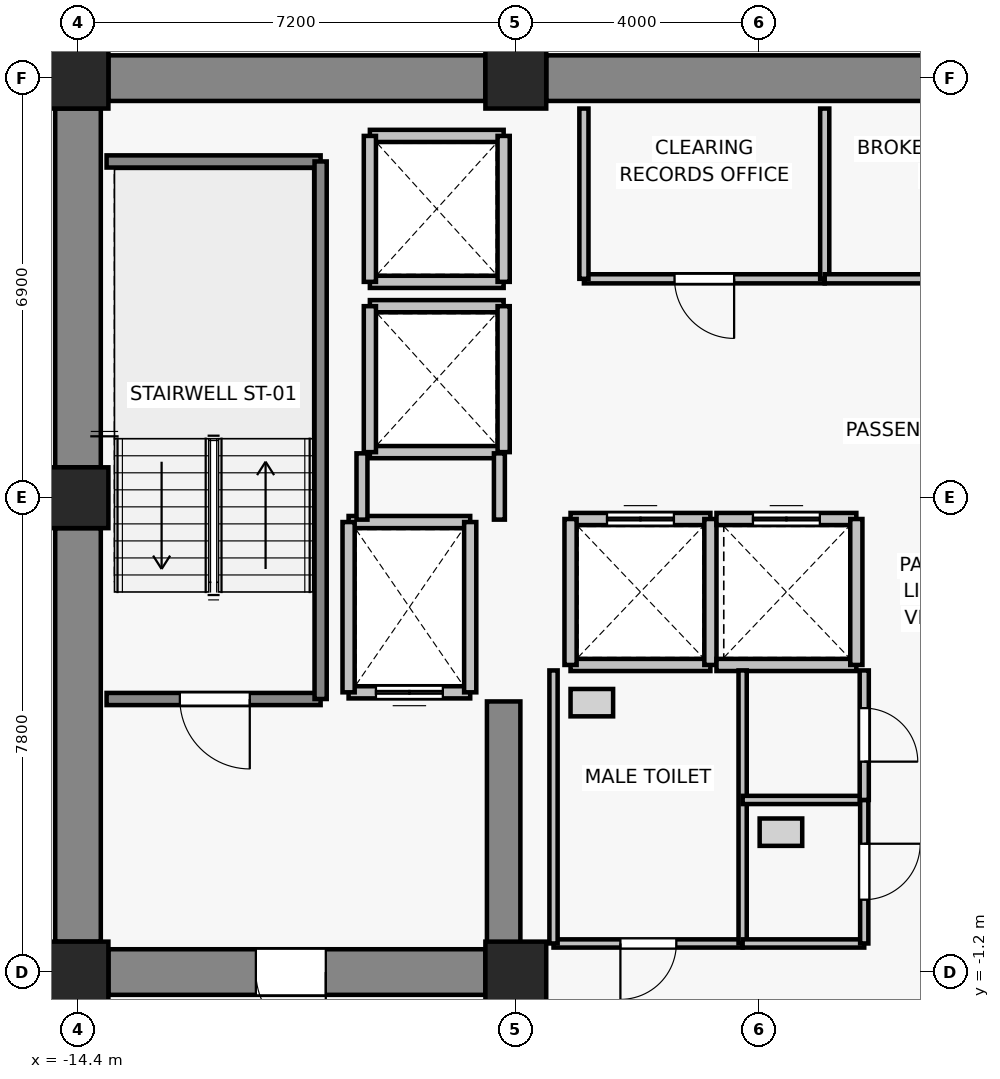
"""IFC4 building model, lengths in metres.
Left out: names, types, materials, properties, quantities, classifications, styles, units other than length and angle.
Written with IfcOpenShell. Run it as: python <this file> out.ifc"""

import sys

from ifc_helpers import new_model, si_unit, direction, frame, frame_2d, origin, origin_2d, place, context, subcontext, project, spatial, rectangle, extrude, source, transform, mapped, element, fill, save


model = new_model("IFC4")
c1 = context("Model", 3, precision=1e-05, world=origin(), true_north=direction((0.0, 1.0)))
c2 = subcontext(c1, "Body", "Model", "MODEL_VIEW")
j1 = project(units=[si_unit("LENGTHUNIT", "METRE"), si_unit("PLANEANGLEUNIT", "RADIAN")], contexts=[c1])
p1 = place(None, origin())
s1 = spatial("IfcSite", under=j1, at=p1, CompositionType="ELEMENT")
p2 = place(p1, origin())
s2 = spatial("IfcBuilding", under=s1, at=p2, CompositionType="ELEMENT")
p3 = place(p2, frame((0.0, 0.0, 113.2)))
s3 = spatial("IfcBuildingStorey", under=s2, at=p3, CompositionType="ELEMENT", Elevation=113.2)
for number, where, z_axis, x_axis in (
    (1, (-14.4, -1.2, 0.0), (0.0, 0.0, 1.0), (1.0, 0.0, 0.0)),
    (2, (-7.2, -1.2, 0.0), (0.0, 0.0, 1.0), (1.0, 0.0, 0.0)),
    (3, (-14.4, 6.6, 0.0), (0.0, 0.0, 1.0), (1.0, 0.0, 0.0)),
    (4, (-14.4, 13.5, 0.0), (0.0, 0.0, 1.0), (1.0, 0.0, 0.0)),
    (5, (-7.2, 13.5, 0.0), (0.0, 0.0, 1.0), (1.0, 0.0, 0.0)),
):
    element("IfcColumn", number, at=place(p3, frame(where, z_axis=z_axis, x_axis=x_axis)), inside=s3, PredefinedType="COLUMN", context=c2, shape_type="SweptSolid", body=[
        extrude(rectangle(XDim=1.0, YDim=1.0, at=origin_2d()), origin(), (0.0, 0.0, 1.0), 3.3),
    ])
p4 = place(p3, frame((-13.9, 13.5, 0.0), z_axis=(0.0, 0.0, 1.0), x_axis=(1.0, 0.0, 0.0)))
e6 = element("IfcWall", 6, at=p4, inside=s3, PredefinedType="SHEAR", context=c2, shape_type="SweptSolid", body=[
    extrude(rectangle(XDim=6.2, YDim=0.75, at=frame_2d((3.1, 0.0))), origin(), (0.0, 0.0, 1.0), 3.075),
])
p5 = place(p3, frame((-6.7, 13.5, 0.0), z_axis=(0.0, 0.0, 1.0), x_axis=(1.0, 0.0, 0.0)))
e7 = element("IfcWall", 7, at=p5, inside=s3, PredefinedType="SHEAR", context=c2, shape_type="SweptSolid", body=[
    extrude(rectangle(XDim=13.4, YDim=0.75, at=frame_2d((6.7, 0.0))), origin(), (0.0, 0.0, 1.0), 3.075),
])
p6 = place(p3, frame((-14.4, -0.7, 0.0), z_axis=(0.0, 0.0, 1.0), x_axis=(0.0, 1.0, 0.0)))
e8 = element("IfcWall", 8, at=p6, inside=s3, PredefinedType="SHEAR", context=c2, shape_type="SweptSolid", body=[
    extrude(rectangle(XDim=6.8, YDim=0.75, at=frame_2d((3.4, 0.0))), origin(), (0.0, 0.0, 1.0), 3.075),
])
p7 = place(p3, frame((-14.4, 7.1, 0.0), z_axis=(0.0, 0.0, 1.0), x_axis=(0.0, 1.0, 0.0)))
e9 = element("IfcWall", 9, at=p7, inside=s3, PredefinedType="SHEAR", context=c2, shape_type="SweptSolid", body=[
    extrude(rectangle(XDim=5.9, YDim=0.75, at=frame_2d((2.95, 0.0))), origin(), (0.0, 0.0, 1.0), 3.075),
])
p8 = place(p3, frame((-7.7, -1.2, 0.0), z_axis=(0.0, 0.0, 1.0), x_axis=(-1.0, 0.0, 0.0)))
e10 = element("IfcWall", 10, at=p8, inside=s3, PredefinedType="SHEAR", context=c2, shape_type="SweptSolid", body=[
    extrude(rectangle(XDim=6.2, YDim=0.75, at=frame_2d((3.1, 0.0))), origin(), (0.0, 0.0, 1.0), 3.075),
])
p9 = place(p8, frame((2.625, 0.0, 0.0)))
e11 = element("IfcOpeningElement", 11, at=p9, cuts=e10, PredefinedType="OPENING", context=c2, shape_type="SweptSolid", body=[
    extrude(rectangle(XDim=1.15, YDim=2.15, at=frame_2d((0.575, 1.075))), frame((0.0, 0.385, 0.0), z_axis=(0.0, -1.0, 0.0), x_axis=(1.0, 0.0, 0.0)), (0.0, 0.0, 1.0), 0.77),
])
p10 = place(p3, frame((-7.4, -0.825, 0.0), z_axis=(0.0, 0.0, 1.0), x_axis=(0.0, 1.0, 0.0)))
e12 = element("IfcWall", 12, at=p10, inside=s3, PredefinedType="SHEAR", context=c2, shape_type="SweptSolid", body=[
    extrude(rectangle(XDim=4.075, YDim=0.55, at=frame_2d((2.038, 0.0))), origin(), (0.0, 0.0, 1.0), 3.075),
])
p11 = place(p3, frame((-7.95, 3.4, 0.0), z_axis=(0.0, 0.0, 1.0), x_axis=(-1.0, 0.0, 0.0)))
e13 = element("IfcWall", 13, at=p11, inside=s3, PredefinedType="SOLIDWALL", context=c2, shape_type="SweptSolid", body=[
    extrude(rectangle(XDim=2.0, YDim=0.2, at=frame_2d((1.0, 0.0))), origin(), (0.0, 0.0, 1.0), 3.075),
])
p12 = place(p11, frame((0.45, 0.0, 0.0)))
e14 = element("IfcOpeningElement", 14, at=p12, cuts=e13, PredefinedType="OPENING", context=c2, shape_type="SweptSolid", body=[
    extrude(rectangle(XDim=1.1, YDim=2.2, at=frame_2d((0.55, 1.1))), frame((0.0, 0.11, 0.0), z_axis=(0.0, -1.0, 0.0), x_axis=(1.0, 0.0, 0.0)), (0.0, 0.0, 1.0), 0.22),
])
p13 = place(p3, frame((-9.95, 6.2, 0.0), z_axis=(0.0, 0.0, 1.0), x_axis=(1.0, 0.0, 0.0)))
e15 = element("IfcWall", 15, at=p13, inside=s3, PredefinedType="SOLIDWALL", context=c2, shape_type="SweptSolid", body=[
    extrude(rectangle(XDim=2.0, YDim=0.2, at=frame_2d((1.0, 0.0))), origin(), (0.0, 0.0, 1.0), 3.075),
])
for number, where, z_axis, x_axis in (
    (16, (-9.95, 3.4, 0.0), (0.0, 0.0, 1.0), (0.0, 1.0, 0.0)),
    (17, (-7.95, 6.2, 0.0), (0.0, 0.0, 1.0), (0.0, -1.0, 0.0)),
):
    element("IfcWall", number, at=place(p3, frame(where, z_axis=z_axis, x_axis=x_axis)), inside=s3, PredefinedType="SOLIDWALL", context=c2, shape_type="SweptSolid", body=[
        extrude(rectangle(XDim=2.8, YDim=0.2, at=frame_2d((1.4, 0.0))), origin(), (0.0, 0.0, 1.0), 3.075),
    ])
p14 = place(p3, frame((-4.0, 3.85, 0.0), z_axis=(0.0, 0.0, 1.0), x_axis=(-1.0, 0.0, 0.0)))
e18 = element("IfcWall", 18, at=p14, inside=s3, PredefinedType="SOLIDWALL", context=c2, shape_type="SweptSolid", body=[
    extrude(rectangle(XDim=2.3, YDim=0.2, at=frame_2d((1.15, 0.0))), origin(), (0.0, 0.0, 1.0), 3.075),
])
p15 = place(p3, frame((-6.3, 6.25, 0.0), z_axis=(0.0, 0.0, 1.0), x_axis=(1.0, 0.0, 0.0)))
e19 = element("IfcWall", 19, at=p15, inside=s3, PredefinedType="SOLIDWALL", context=c2, shape_type="SweptSolid", body=[
    extrude(rectangle(XDim=2.3, YDim=0.2, at=frame_2d((1.15, 0.0))), origin(), (0.0, 0.0, 1.0), 3.075),
])
p16 = place(p15, frame((0.6, 0.0, 0.0)))
e20 = element("IfcOpeningElement", 20, at=p16, cuts=e19, PredefinedType="OPENING", context=c2, shape_type="SweptSolid", body=[
    extrude(rectangle(XDim=1.1, YDim=2.2, at=frame_2d((0.55, 1.1))), frame((0.0, 0.11, 0.0), z_axis=(0.0, -1.0, 0.0), x_axis=(1.0, 0.0, 0.0)), (0.0, 0.0, 1.0), 0.22),
])
for number, where, z_axis, x_axis in (
    (21, (-6.3, 3.85, 0.0), (0.0, 0.0, 1.0), (0.0, 1.0, 0.0)),
    (22, (-4.0, 6.25, 0.0), (0.0, 0.0, 1.0), (0.0, -1.0, 0.0)),
):
    element("IfcWall", number, at=place(p3, frame(where, z_axis=z_axis, x_axis=x_axis)), inside=s3, PredefinedType="SOLIDWALL", context=c2, shape_type="SweptSolid", body=[
        extrude(rectangle(XDim=2.4, YDim=0.2, at=frame_2d((1.2, 0.0))), origin(), (0.0, 0.0, 1.0), 3.075),
    ])
p17 = place(p3, frame((-1.6, 3.85, 0.0), z_axis=(0.0, 0.0, 1.0), x_axis=(-1.0, 0.0, 0.0)))
e23 = element("IfcWall", 23, at=p17, inside=s3, PredefinedType="SOLIDWALL", context=c2, shape_type="SweptSolid", body=[
    extrude(rectangle(XDim=2.3, YDim=0.2, at=frame_2d((1.15, 0.0))), origin(), (0.0, 0.0, 1.0), 3.075),
])
p18 = place(p3, frame((-3.9, 6.25, 0.0), z_axis=(0.0, 0.0, 1.0), x_axis=(1.0, 0.0, 0.0)))
e24 = element("IfcWall", 24, at=p18, inside=s3, PredefinedType="SOLIDWALL", context=c2, shape_type="SweptSolid", body=[
    extrude(rectangle(XDim=2.3, YDim=0.2, at=frame_2d((1.15, 0.0))), origin(), (0.0, 0.0, 1.0), 3.075),
])
p19 = place(p18, frame((0.6, 0.0, 0.0)))
e25 = element("IfcOpeningElement", 25, at=p19, cuts=e24, PredefinedType="OPENING", context=c2, shape_type="SweptSolid", body=[
    extrude(rectangle(XDim=1.1, YDim=2.2, at=frame_2d((0.55, 1.1))), frame((0.0, 0.11, 0.0), z_axis=(0.0, -1.0, 0.0), x_axis=(1.0, 0.0, 0.0)), (0.0, 0.0, 1.0), 0.22),
])
p20 = place(p3, frame((-1.6, 6.25, 0.0), z_axis=(0.0, 0.0, 1.0), x_axis=(0.0, -1.0, 0.0)))
e26 = element("IfcWall", 26, at=p20, inside=s3, PredefinedType="SOLIDWALL", context=c2, shape_type="SweptSolid", body=[
    extrude(rectangle(XDim=2.4, YDim=0.2, at=frame_2d((1.2, 0.0))), origin(), (0.0, 0.0, 1.0), 3.075),
])
for number, where, z_axis, x_axis in (
    (27, (-7.4, 7.35, 0.0), (0.0, 0.0, 1.0), (-1.0, 0.0, 0.0)),
    (28, (-9.6, 9.75, 0.0), (0.0, 0.0, 1.0), (1.0, 0.0, 0.0)),
):
    element("IfcWall", number, at=place(p3, frame(where, z_axis=z_axis, x_axis=x_axis)), inside=s3, PredefinedType="SOLIDWALL", context=c2, shape_type="SweptSolid", body=[
        extrude(rectangle(XDim=2.2, YDim=0.2, at=frame_2d((1.1, 0.0))), origin(), (0.0, 0.0, 1.0), 2.515),
    ])
p21 = place(p3, frame((-9.6, 7.35, 0.0), z_axis=(0.0, 0.0, 1.0), x_axis=(0.0, 1.0, 0.0)))
e29 = element("IfcWall", 29, at=p21, inside=s3, PredefinedType="SOLIDWALL", context=c2, shape_type="SweptSolid", body=[
    extrude(rectangle(XDim=2.4, YDim=0.2, at=frame_2d((1.2, 0.0))), origin(), (0.0, 0.0, 1.0), 3.075),
])
p22 = place(p3, frame((-7.4, 9.75, 0.0), z_axis=(0.0, 0.0, 1.0), x_axis=(0.0, -1.0, 0.0)))
e30 = element("IfcWall", 30, at=p22, inside=s3, PredefinedType="SOLIDWALL", context=c2, shape_type="SweptSolid", body=[
    extrude(rectangle(XDim=2.4, YDim=0.2, at=frame_2d((1.2, 0.0))), origin(), (0.0, 0.0, 1.0), 2.515),
])
for number, where, z_axis, x_axis in (
    (31, (-7.4, 10.15, 0.0), (0.0, 0.0, 1.0), (-1.0, 0.0, 0.0)),
    (32, (-9.6, 12.55, 0.0), (0.0, 0.0, 1.0), (1.0, 0.0, 0.0)),
):
    element("IfcWall", number, at=place(p3, frame(where, z_axis=z_axis, x_axis=x_axis)), inside=s3, PredefinedType="SOLIDWALL", context=c2, shape_type="SweptSolid", body=[
        extrude(rectangle(XDim=2.2, YDim=0.2, at=frame_2d((1.1, 0.0))), origin(), (0.0, 0.0, 1.0), 2.515),
    ])
p23 = place(p3, frame((-9.6, 10.15, 0.0), z_axis=(0.0, 0.0, 1.0), x_axis=(0.0, 1.0, 0.0)))
e33 = element("IfcWall", 33, at=p23, inside=s3, PredefinedType="SOLIDWALL", context=c2, shape_type="SweptSolid", body=[
    extrude(rectangle(XDim=2.4, YDim=0.2, at=frame_2d((1.2, 0.0))), origin(), (0.0, 0.0, 1.0), 3.075),
])
p24 = place(p3, frame((-7.4, 12.55, 0.0), z_axis=(0.0, 0.0, 1.0), x_axis=(0.0, -1.0, 0.0)))
e34 = element("IfcWall", 34, at=p24, inside=s3, PredefinedType="SOLIDWALL", context=c2, shape_type="SweptSolid", body=[
    extrude(rectangle(XDim=2.4, YDim=0.2, at=frame_2d((1.2, 0.0))), origin(), (0.0, 0.0, 1.0), 2.515),
])
p25 = place(p3, frame((-10.41, 3.29, 0.0), z_axis=(0.0, 0.0, 1.0), x_axis=(-1.0, 0.0, 0.0)))
e35 = element("IfcWall", 35, at=p25, inside=s3, PredefinedType="SOLIDWALL", context=c2, shape_type="SweptSolid", body=[
    extrude(rectangle(XDim=3.52, YDim=0.2, at=frame_2d((1.76, 0.0))), origin(), (0.0, 0.0, 1.0), 3.075),
])
p26 = place(p25, frame((1.165, 0.0, 0.0)))
e36 = element("IfcOpeningElement", 36, at=p26, cuts=e35, PredefinedType="OPENING", context=c2, shape_type="SweptSolid", body=[
    extrude(rectangle(XDim=1.15, YDim=2.15, at=frame_2d((0.575, 1.075))), frame((0.0, 0.11, 0.0), z_axis=(0.0, -1.0, 0.0), x_axis=(1.0, 0.0, 0.0)), (0.0, 0.0, 1.0), 0.22),
])
p27 = place(p3, frame((-13.93, 12.13, 0.0), z_axis=(0.0, 0.0, 1.0), x_axis=(1.0, 0.0, 0.0)))
e37 = element("IfcWall", 37, at=p27, inside=s3, PredefinedType="SOLIDWALL", context=c2, shape_type="SweptSolid", body=[
    extrude(rectangle(XDim=3.52, YDim=0.2, at=frame_2d((1.76, 0.0))), origin(), (0.0, 0.0, 1.0), 3.075),
])
p28 = place(p3, frame((-10.41, 12.13, 0.0), z_axis=(0.0, 0.0, 1.0), x_axis=(0.0, -1.0, 0.0)))
e38 = element("IfcWall", 38, at=p28, inside=s3, PredefinedType="SOLIDWALL", context=c2, shape_type="SweptSolid", body=[
    extrude(rectangle(XDim=8.84, YDim=0.2, at=frame_2d((4.42, 0.0))), origin(), (0.0, 0.0, 1.0), 3.075),
])
p29 = place(p3, frame((-9.73, 6.24, 0.0), z_axis=(0.0, 0.0, 1.0), x_axis=(0.0, 1.0, 0.0)))
e39 = element("IfcWall", 39, at=p29, inside=s3, PredefinedType="PARTITIONING", context=c2, shape_type="SweptSolid", body=[
    extrude(rectangle(XDim=1.09, YDim=0.18, at=frame_2d((0.545, 0.0))), origin(), (0.0, 0.0, 1.0), 3.075),
])
p30 = place(p3, frame((-7.47, 7.33, 0.0), z_axis=(0.0, 0.0, 1.0), x_axis=(0.0, -1.0, 0.0)))
e40 = element("IfcWall", 40, at=p30, inside=s3, PredefinedType="PARTITIONING", context=c2, shape_type="SweptSolid", body=[
    extrude(rectangle(XDim=1.09, YDim=0.18, at=frame_2d((0.545, 0.0))), origin(), (0.0, 0.0, 1.0), 2.515),
])
p31 = place(p3, frame((-2.12, 10.2, 0.0), z_axis=(0.0, 0.0, 1.0), x_axis=(-1.0, 0.0, 0.0)))
e41 = element("IfcWall", 41, at=p31, inside=s3, PredefinedType="PARTITIONING", context=c2, shape_type="SweptSolid", body=[
    extrude(rectangle(XDim=3.96, YDim=0.15, at=frame_2d((1.98, 0.0))), origin(), (0.0, 0.0, 1.0), 3.075),
])
p32 = place(p31, frame((1.49, 0.0, 0.0)))
e42 = element("IfcOpeningElement", 42, at=p32, cuts=e41, PredefinedType="OPENING", context=c2, shape_type="SweptSolid", body=[
    extrude(rectangle(XDim=0.98, YDim=2.15, at=frame_2d((0.49, 1.075))), frame((0.0, 0.085, 0.0), z_axis=(0.0, -1.0, 0.0), x_axis=(1.0, 0.0, 0.0)), (0.0, 0.0, 1.0), 0.17),
])
for number, where, z_axis, x_axis in (
    (43, (-6.08, 10.2, 0.0), (0.0, 0.0, 1.0), (0.0, 1.0, 0.0)),
    (44, (-2.12, 13.0, 0.0), (0.0, 0.0, 1.0), (0.0, -1.0, 0.0)),
):
    element("IfcWall", number, at=place(p3, frame(where, z_axis=z_axis, x_axis=x_axis)), inside=s3, PredefinedType="PARTITIONING", context=c2, shape_type="SweptSolid", body=[
        extrude(rectangle(XDim=2.8, YDim=0.15, at=frame_2d((1.4, 0.0))), origin(), (0.0, 0.0, 1.0), 3.075),
    ])
p33 = place(p3, frame((2.04, 10.2, 0.0), z_axis=(0.0, 0.0, 1.0), x_axis=(-1.0, 0.0, 0.0)))
e45 = element("IfcWall", 45, at=p33, inside=s3, PredefinedType="PARTITIONING", context=c2, shape_type="SweptSolid", body=[
    extrude(rectangle(XDim=4.16, YDim=0.15, at=frame_2d((2.08, 0.0))), origin(), (0.0, 0.0, 1.0), 3.075),
])
p34 = place(p33, frame((1.55, 0.0, 0.0)))
e46 = element("IfcOpeningElement", 46, at=p34, cuts=e45, PredefinedType="OPENING", context=c2, shape_type="SweptSolid", body=[
    extrude(rectangle(XDim=0.98, YDim=2.15, at=frame_2d((0.49, 1.075))), frame((0.0, 0.085, 0.0), z_axis=(0.0, -1.0, 0.0), x_axis=(1.0, 0.0, 0.0)), (0.0, 0.0, 1.0), 0.17),
])
p35 = place(p3, frame((-3.47, -0.73, 0.0), z_axis=(0.0, 0.0, 1.0), x_axis=(-1.0, 0.0, 0.0)))
e47 = element("IfcWall", 47, at=p35, inside=s3, PredefinedType="PARTITIONING", context=c2, shape_type="SweptSolid", body=[
    extrude(rectangle(XDim=3.11, YDim=0.135, at=frame_2d((1.555, 0.0))), origin(), (0.0, 0.0, 1.0), 3.075),
])
p36 = place(p35, frame((1.09, 0.0, 0.0)))
e48 = element("IfcOpeningElement", 48, at=p36, cuts=e47, PredefinedType="OPENING", context=c2, shape_type="SweptSolid", body=[
    extrude(rectangle(XDim=0.92, YDim=2.1, at=frame_2d((0.46, 1.05))), frame((0.0, 0.077, 0.0), z_axis=(0.0, -1.0, 0.0), x_axis=(1.0, 0.0, 0.0)), (0.0, 0.0, 1.0), 0.155),
])
for number, where, z_axis, x_axis in (
    (49, (-6.58, -0.73, 0.0), (0.0, 0.0, 1.0), (0.0, 1.0, 0.0)),
    (50, (-3.47, 3.76, 0.0), (0.0, 0.0, 1.0), (0.0, -1.0, 0.0)),
):
    element("IfcWall", number, at=place(p3, frame(where, z_axis=z_axis, x_axis=x_axis)), inside=s3, PredefinedType="PARTITIONING", context=c2, shape_type="SweptSolid", body=[
        extrude(rectangle(XDim=4.49, YDim=0.135, at=frame_2d((2.245, 0.0))), origin(), (0.0, 0.0, 1.0), 3.075),
    ])
for number, where, z_axis, x_axis in (
    (51, (-1.47, -0.73, 0.0), (0.0, 0.0, 1.0), (-1.0, 0.0, 0.0)),
    (52, (-3.47, 1.63, 0.0), (0.0, 0.0, 1.0), (1.0, 0.0, 0.0)),
):
    element("IfcWall", number, at=place(p3, frame(where, z_axis=z_axis, x_axis=x_axis)), inside=s3, PredefinedType="PARTITIONING", context=c2, shape_type="SweptSolid", body=[
        extrude(rectangle(XDim=2.0, YDim=0.135, at=frame_2d((1.0, 0.0))), origin(), (0.0, 0.0, 1.0), 3.075),
    ])
p37 = place(p3, frame((-1.47, 1.63, 0.0), z_axis=(0.0, 0.0, 1.0), x_axis=(0.0, -1.0, 0.0)))
e53 = element("IfcWall", 53, at=p37, inside=s3, PredefinedType="PARTITIONING", context=c2, shape_type="SweptSolid", body=[
    extrude(rectangle(XDim=2.36, YDim=0.135, at=frame_2d((1.18, 0.0))), origin(), (0.0, 0.0, 1.0), 3.075),
])
p38 = place(p37, frame((0.72, 0.0, 0.0)))
e54 = element("IfcOpeningElement", 54, at=p38, cuts=e53, PredefinedType="OPENING", context=c2, shape_type="SweptSolid", body=[
    extrude(rectangle(XDim=0.92, YDim=2.1, at=frame_2d((0.46, 1.05))), frame((0.0, 0.077, 0.0), z_axis=(0.0, -1.0, 0.0), x_axis=(1.0, 0.0, 0.0)), (0.0, 0.0, 1.0), 0.155),
])
p39 = place(p3, frame((-1.47, 3.76, 0.0), z_axis=(0.0, 0.0, 1.0), x_axis=(0.0, -1.0, 0.0)))
e55 = element("IfcWall", 55, at=p39, inside=s3, PredefinedType="PARTITIONING", context=c2, shape_type="SweptSolid", body=[
    extrude(rectangle(XDim=2.13, YDim=0.15, at=frame_2d((1.065, 0.0))), origin(), (0.0, 0.0, 1.0), 3.075),
])
p40 = place(p39, frame((0.62, 0.0, 0.0)))
e56 = element("IfcOpeningElement", 56, at=p40, cuts=e55, PredefinedType="OPENING", context=c2, shape_type="SweptSolid", body=[
    extrude(rectangle(XDim=0.88, YDim=2.1, at=frame_2d((0.44, 1.05))), frame((0.0, 0.085, 0.0), z_axis=(0.0, -1.0, 0.0), x_axis=(1.0, 0.0, 0.0)), (0.0, 0.0, 1.0), 0.17),
])
m1 = source(origin(), c2, "Body", "SweptSolid", [
    extrude(rectangle(XDim=1.1, YDim=2.2, at=frame_2d((0.55, 1.1))), frame((0.0, 0.025, 0.0), z_axis=(0.0, -1.0, 0.0), x_axis=(1.0, 0.0, 0.0)), (0.0, 0.0, 1.0), 0.05),
])
p41 = place(p12, origin())
e57 = element("IfcDoor", 57, at=p41, inside=s3, OperationType="DOUBLE_DOOR_SLIDING", PredefinedType="DOOR", context=c2, shape_type="MappedRepresentation", body=[
    mapped(m1, transform((0.0, 0.0, 0.0), x_axis=(1.0, 0.0, 0.0), y_axis=(0.0, 1.0, 0.0), z_axis=(0.0, 0.0, 1.0), scale=1.0)),
])
fill(e14, e57)
p42 = place(p16, origin())
e58 = element("IfcDoor", 58, at=p42, inside=s3, OperationType="DOUBLE_DOOR_SLIDING", PredefinedType="DOOR", context=c2, shape_type="MappedRepresentation", body=[
    mapped(m1, transform((0.0, 0.0, 0.0), x_axis=(1.0, 0.0, 0.0), y_axis=(0.0, 1.0, 0.0), z_axis=(0.0, 0.0, 1.0), scale=1.0)),
])
fill(e20, e58)
p43 = place(p19, origin())
e59 = element("IfcDoor", 59, at=p43, inside=s3, OperationType="DOUBLE_DOOR_SLIDING", PredefinedType="DOOR", context=c2, shape_type="MappedRepresentation", body=[
    mapped(m1, transform((0.0, 0.0, 0.0), x_axis=(1.0, 0.0, 0.0), y_axis=(0.0, 1.0, 0.0), z_axis=(0.0, 0.0, 1.0), scale=1.0)),
])
fill(e25, e59)
m2 = source(origin(), c2, "Body", "SweptSolid", [
    extrude(rectangle(XDim=1.15, YDim=2.15, at=frame_2d((0.575, 1.075))), frame((0.0, 0.025, 0.0), z_axis=(0.0, -1.0, 0.0), x_axis=(1.0, 0.0, 0.0)), (0.0, 0.0, 1.0), 0.05),
])
p44 = place(p26, origin())
e60 = element("IfcDoor", 60, at=p44, inside=s3, OperationType="SINGLE_SWING_LEFT", PredefinedType="DOOR", context=c2, shape_type="MappedRepresentation", body=[
    mapped(m2, transform((0.0, 0.0, 0.0), x_axis=(1.0, 0.0, 0.0), y_axis=(0.0, 1.0, 0.0), z_axis=(0.0, 0.0, 1.0), scale=1.0)),
])
fill(e36, e60)
p45 = place(p9, origin())
e61 = element("IfcDoor", 61, at=p45, inside=s3, OperationType="SINGLE_SWING_LEFT", PredefinedType="DOOR", context=c2, shape_type="MappedRepresentation", body=[
    mapped(m2, transform((0.0, 0.0, 0.0), x_axis=(1.0, 0.0, 0.0), y_axis=(0.0, 1.0, 0.0), z_axis=(0.0, 0.0, 1.0), scale=1.0)),
])
fill(e11, e61)
m3 = source(origin(), c2, "Body", "SweptSolid", [
    extrude(rectangle(XDim=0.98, YDim=2.15, at=frame_2d((0.49, 1.075))), frame((0.0, 0.025, 0.0), z_axis=(0.0, -1.0, 0.0), x_axis=(1.0, 0.0, 0.0)), (0.0, 0.0, 1.0), 0.05),
])
p46 = place(p32, origin())
e62 = element("IfcDoor", 62, at=p46, inside=s3, OperationType="SINGLE_SWING_LEFT", PredefinedType="DOOR", context=c2, shape_type="MappedRepresentation", body=[
    mapped(m3, transform((0.0, 0.0, 0.0), x_axis=(1.0, 0.0, 0.0), y_axis=(0.0, 1.0, 0.0), z_axis=(0.0, 0.0, 1.0), scale=1.0)),
])
fill(e42, e62)
m4 = source(origin(), c2, "Body", "SweptSolid", [
    extrude(rectangle(XDim=0.92, YDim=2.1, at=frame_2d((0.46, 1.05))), frame((0.0, 0.025, 0.0), z_axis=(0.0, -1.0, 0.0), x_axis=(1.0, 0.0, 0.0)), (0.0, 0.0, 1.0), 0.05),
])
p47 = place(p36, origin())
e63 = element("IfcDoor", 63, at=p47, inside=s3, OperationType="SINGLE_SWING_RIGHT", PredefinedType="DOOR", context=c2, shape_type="MappedRepresentation", body=[
    mapped(m4, transform((0.0, 0.0, 0.0), x_axis=(1.0, 0.0, 0.0), y_axis=(0.0, 1.0, 0.0), z_axis=(0.0, 0.0, 1.0), scale=1.0)),
])
fill(e48, e63)
p48 = place(p38, origin())
e64 = element("IfcDoor", 64, at=p48, inside=s3, OperationType="SINGLE_SWING_LEFT", PredefinedType="DOOR", context=c2, shape_type="MappedRepresentation", body=[
    mapped(m4, transform((0.0, 0.0, 0.0), x_axis=(1.0, 0.0, 0.0), y_axis=(0.0, 1.0, 0.0), z_axis=(0.0, 0.0, 1.0), scale=1.0)),
])
fill(e54, e64)
m5 = source(origin(), c2, "Body", "SweptSolid", [
    extrude(rectangle(XDim=0.88, YDim=2.1, at=frame_2d((0.44, 1.05))), frame((0.0, 0.025, 0.0), z_axis=(0.0, -1.0, 0.0), x_axis=(1.0, 0.0, 0.0)), (0.0, 0.0, 1.0), 0.05),
])
p49 = place(p40, origin())
e65 = element("IfcDoor", 65, at=p49, inside=s3, OperationType="SINGLE_SWING_RIGHT", PredefinedType="DOOR", context=c2, shape_type="MappedRepresentation", body=[
    mapped(m5, transform((0.0, 0.0, 0.0), x_axis=(1.0, 0.0, 0.0), y_axis=(0.0, 1.0, 0.0), z_axis=(0.0, 0.0, 1.0), scale=1.0)),
])
fill(e56, e65)
save(model, sys.argv[1])
